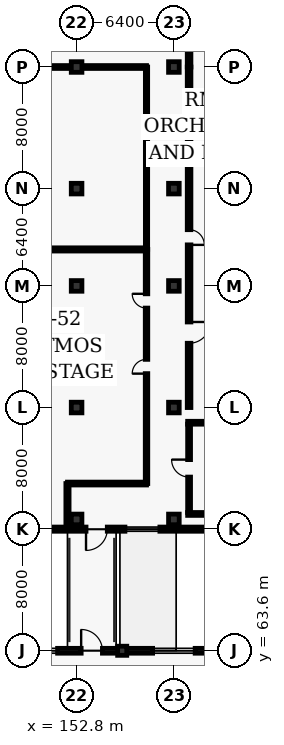
"""IFC4 building model, lengths in metres.
Left out: names, types, materials, properties, quantities, classifications, styles, units other than length and angle.
Written with IfcOpenShell. Run it as: python <this file> out.ifc"""

import sys

from ifc_helpers import new_model, si_unit, direction, frame, frame_2d, origin, origin_2d, place, context, subcontext, project, spatial, rectangle, extrude, element, fill, save


model = new_model("IFC4")
c1 = context("Model", 3, precision=1e-05, world=origin(), true_north=direction((0.0, 1.0)))
c2 = subcontext(c1, "Body", "Model", "MODEL_VIEW")
j1 = project(units=[si_unit("LENGTHUNIT", "METRE"), si_unit("PLANEANGLEUNIT", "RADIAN")], contexts=[c1])
p1 = place(None, origin())
s1 = spatial("IfcSite", under=j1, at=p1, CompositionType="ELEMENT")
p2 = place(p1, origin())
s2 = spatial("IfcBuilding", under=s1, at=p2, CompositionType="ELEMENT")
p3 = place(p2, frame((0.0, 0.0, 10.2)))
s3 = spatial("IfcBuildingStorey", under=s2, at=p3, CompositionType="ELEMENT", Elevation=10.2)
p4 = place(p3, frame((155.8, 63.6, 0.0), z_axis=(0.0, 0.0, 1.0), x_axis=(1.0, 0.0, 0.0)))
e1 = element("IfcColumn", 1, at=p4, inside=s3, PredefinedType="COLUMN", context=c2, shape_type="SweptSolid", body=[
    extrude(rectangle(XDim=0.6, YDim=0.6, at=origin_2d()), origin(), (0.0, 0.0, 1.0), 5.4),
])
for number, where, z_axis, x_axis in (
    (2, (152.8, 72.24, 0.0), (0.0, 0.0, 1.0), (1.0, 0.0, 0.0)),
    (3, (152.8, 79.6, 0.0), (0.0, 0.0, 1.0), (1.0, 0.0, 0.0)),
    (4, (152.8, 87.6, 0.0), (0.0, 0.0, 1.0), (1.0, 0.0, 0.0)),
    (5, (152.8, 94.0, 0.0), (0.0, 0.0, 1.0), (1.0, 0.0, 0.0)),
    (6, (152.8, 102.0, 0.0), (0.0, 0.0, 1.0), (1.0, 0.0, 0.0)),
    (7, (159.2, 72.24, 0.0), (0.0, 0.0, 1.0), (1.0, 0.0, 0.0)),
    (8, (159.2, 79.6, 0.0), (0.0, 0.0, 1.0), (1.0, 0.0, 0.0)),
    (9, (159.2, 87.6, 0.0), (0.0, 0.0, 1.0), (1.0, 0.0, 0.0)),
    (10, (159.2, 94.0, 0.0), (0.0, 0.0, 1.0), (1.0, 0.0, 0.0)),
    (11, (159.2, 102.0, 0.0), (0.0, 0.0, 1.0), (1.0, 0.0, 0.0)),
):
    element("IfcColumn", number, at=place(p3, frame(where, z_axis=z_axis, x_axis=x_axis)), inside=s3, PredefinedType="COLUMN", context=c2, shape_type="SweptSolid", body=[
        extrude(rectangle(XDim=0.7, YDim=0.7, at=origin_2d()), origin(), (0.0, 0.0, 1.0), 5.4),
    ])
p5 = place(p3, frame((149.2, 63.6, 0.0), z_axis=(0.0, 0.0, 1.0), x_axis=(1.0, 0.0, 0.0)))
e12 = element("IfcWall", 12, at=p5, inside=s3, PredefinedType="SOLIDWALL", context=c2, shape_type="SweptSolid", body=[
    extrude(rectangle(XDim=22.8, YDim=0.32, at=frame_2d((11.4, 0.0))), origin(), (0.0, 0.0, 1.0), 4.3),
])
p6 = place(p5, frame((0.75, 0.0, 0.9)))
e13 = element("IfcOpeningElement", 13, at=p6, cuts=e12, PredefinedType="OPENING", context=c2, shape_type="SweptSolid", body=[
    extrude(rectangle(XDim=1.6, YDim=1.65, at=frame_2d((0.8, 0.825))), frame((0.0, 0.17, 0.0), z_axis=(0.0, -1.0, 0.0), x_axis=(1.0, 0.0, 0.0)), (0.0, 0.0, 1.0), 0.34),
])
p7 = place(p5, frame((8.6, 0.0, 0.9)))
e14 = element("IfcOpeningElement", 14, at=p7, cuts=e12, PredefinedType="OPENING", context=c2, shape_type="SweptSolid", body=[
    extrude(rectangle(XDim=2.8, YDim=2.4, at=frame_2d((1.4, 1.2))), frame((0.0, 0.17, 0.0), z_axis=(0.0, -1.0, 0.0), x_axis=(1.0, 0.0, 0.0)), (0.0, 0.0, 1.0), 0.34),
])
p8 = place(p5, frame((3.9, 0.0, 0.0)))
e15 = element("IfcOpeningElement", 15, at=p8, cuts=e12, PredefinedType="OPENING", context=c2, shape_type="SweptSolid", body=[
    extrude(rectangle(XDim=1.4, YDim=2.25, at=frame_2d((0.7, 1.125))), frame((0.0, 0.17, 0.0), z_axis=(0.0, -1.0, 0.0), x_axis=(1.0, 0.0, 0.0)), (0.0, 0.0, 1.0), 0.34),
])
p9 = place(p3, frame((172.0, 71.6, 0.0), z_axis=(0.0, 0.0, 1.0), x_axis=(-1.0, 0.0, 0.0)))
e16 = element("IfcWall", 16, at=p9, inside=s3, PredefinedType="SOLIDWALL", context=c2, shape_type="SweptSolid", body=[
    extrude(rectangle(XDim=32.4, YDim=0.275, at=frame_2d((16.2, 0.0))), origin(), (0.0, 0.0, 1.0), 5.16),
])
p10 = place(p9, frame((7.96, 0.0, 0.8)))
e17 = element("IfcOpeningElement", 17, at=p10, cuts=e16, PredefinedType="OPENING", context=c2, shape_type="SweptSolid", body=[
    extrude(rectangle(XDim=2.2, YDim=2.25, at=frame_2d((1.1, 1.125))), frame((0.0, 0.147, 0.0), z_axis=(0.0, -1.0, 0.0), x_axis=(1.0, 0.0, 0.0)), (0.0, 0.0, 1.0), 0.295),
])
p11 = place(p9, frame((13.72, 0.0, 0.8)))
e18 = element("IfcOpeningElement", 18, at=p11, cuts=e16, PredefinedType="OPENING", context=c2, shape_type="SweptSolid", body=[
    extrude(rectangle(XDim=2.3, YDim=2.25, at=frame_2d((1.15, 1.125))), frame((0.0, 0.147, 0.0), z_axis=(0.0, -1.0, 0.0), x_axis=(1.0, 0.0, 0.0)), (0.0, 0.0, 1.0), 0.295),
])
p12 = place(p9, frame((20.93, 0.0, 0.8)))
e19 = element("IfcOpeningElement", 19, at=p12, cuts=e16, PredefinedType="OPENING", context=c2, shape_type="SweptSolid", body=[
    extrude(rectangle(XDim=2.4, YDim=2.3, at=frame_2d((1.2, 1.15))), frame((0.0, 0.147, 0.0), z_axis=(0.0, -1.0, 0.0), x_axis=(1.0, 0.0, 0.0)), (0.0, 0.0, 1.0), 0.295),
])
p13 = place(p9, frame((25.24, 0.0, 0.8)))
e20 = element("IfcOpeningElement", 20, at=p13, cuts=e16, PredefinedType="OPENING", context=c2, shape_type="SweptSolid", body=[
    extrude(rectangle(XDim=2.5, YDim=2.3, at=frame_2d((1.25, 1.15))), frame((0.0, 0.147, 0.0), z_axis=(0.0, -1.0, 0.0), x_axis=(1.0, 0.0, 0.0)), (0.0, 0.0, 1.0), 0.295),
])
p14 = place(p9, frame((17.18, 0.0, 0.0)))
e21 = element("IfcOpeningElement", 21, at=p14, cuts=e16, PredefinedType="OPENING", context=c2, shape_type="SweptSolid", body=[
    extrude(rectangle(XDim=1.4, YDim=2.25, at=frame_2d((0.7, 1.125))), frame((0.0, 0.147, 0.0), z_axis=(0.0, -1.0, 0.0), x_axis=(1.0, 0.0, 0.0)), (0.0, 0.0, 1.0), 0.295),
])
p15 = place(p3, frame((160.105, 72.6, 0.0), z_axis=(0.0, 0.0, 1.0), x_axis=(1.0, 0.0, 0.0)))
e22 = element("IfcWall", 22, at=p15, inside=s3, PredefinedType="PARTITIONING", context=c2, shape_type="SweptSolid", body=[
    extrude(rectangle(XDim=4.143, YDim=0.19, at=frame_2d((2.072, 0.0))), origin(), (0.0, 0.0, 1.0), 4.51),
])
p16 = place(p3, frame((160.105, 78.6, 0.0), z_axis=(0.0, 0.0, 1.0), x_axis=(1.0, 0.0, 0.0)))
e23 = element("IfcWall", 23, at=p16, inside=s3, PredefinedType="PARTITIONING", context=c2, shape_type="SweptSolid", body=[
    extrude(rectangle(XDim=4.495, YDim=0.19, at=frame_2d((2.248, 0.0))), origin(), (0.0, 0.0, 1.0), 5.16),
])
p17 = place(p3, frame((160.2, 72.695, 0.0), z_axis=(0.0, 0.0, 1.0), x_axis=(0.0, 1.0, 0.0)))
e24 = element("IfcWall", 24, at=p17, inside=s3, PredefinedType="PARTITIONING", context=c2, shape_type="SweptSolid", body=[
    extrude(rectangle(XDim=5.81, YDim=0.19, at=frame_2d((2.905, 0.0))), origin(), (0.0, 0.0, 1.0), 5.16),
])
p18 = place(p17, frame((2.33, 0.0, 0.0)))
e25 = element("IfcOpeningElement", 25, at=p18, cuts=e24, PredefinedType="OPENING", context=c2, shape_type="SweptSolid", body=[
    extrude(rectangle(XDim=1.15, YDim=2.2, at=frame_2d((0.575, 1.1))), frame((0.0, 0.105, 0.0), z_axis=(0.0, -1.0, 0.0), x_axis=(1.0, 0.0, 0.0)), (0.0, 0.0, 1.0), 0.21),
])
p19 = place(p3, frame((157.4, 102.0, 0.0), z_axis=(0.0, 0.0, 1.0), x_axis=(-1.0, 0.0, 0.0)))
e26 = element("IfcWall", 26, at=p19, inside=s3, PredefinedType="PARTITIONING", context=c2, shape_type="SweptSolid", body=[
    extrude(rectangle(XDim=17.8, YDim=0.19, at=frame_2d((8.9, 0.0))), origin(), (0.0, 0.0, 1.0), 4.51),
])
p20 = place(p19, frame((8.38, 0.0, 0.0)))
e27 = element("IfcOpeningElement", 27, at=p20, cuts=e26, PredefinedType="OPENING", context=c2, shape_type="SweptSolid", body=[
    extrude(rectangle(XDim=1.04, YDim=2.2, at=frame_2d((0.52, 1.1))), frame((0.0, 0.105, 0.0), z_axis=(0.0, -1.0, 0.0), x_axis=(1.0, 0.0, 0.0)), (0.0, 0.0, 1.0), 0.21),
])
p21 = place(p3, frame((160.2, 110.0, 0.0), z_axis=(0.0, 0.0, 1.0), x_axis=(0.0, -1.0, 0.0)))
e28 = element("IfcWall", 28, at=p21, inside=s3, PredefinedType="PARTITIONING", context=c2, shape_type="SweptSolid", body=[
    extrude(rectangle(XDim=8.0, YDim=0.24, at=frame_2d((4.0, 0.0))), origin(), (0.0, 0.0, 1.0), 5.16),
])
p22 = place(p3, frame((152.2, 71.6, 0.0), z_axis=(0.0, 0.0, 1.0), x_axis=(0.0, 1.0, 0.0)))
e29 = element("IfcWall", 29, at=p22, inside=s3, PredefinedType="PARTITIONING", context=c2, shape_type="SweptSolid", body=[
    extrude(rectangle(XDim=3.0, YDim=0.21, at=frame_2d((1.5, 0.0))), origin(), (0.0, 0.0, 1.0), 5.16),
])
p23 = place(p3, frame((152.2, 74.6, 0.0), z_axis=(0.0, 0.0, 1.0), x_axis=(1.0, 0.0, 0.0)))
e30 = element("IfcWall", 30, at=p23, inside=s3, PredefinedType="PARTITIONING", context=c2, shape_type="SweptSolid", body=[
    extrude(rectangle(XDim=5.2, YDim=0.19, at=frame_2d((2.6, 0.0))), origin(), (0.0, 0.0, 1.0), 5.16),
])
p24 = place(p3, frame((157.4, 74.6, 0.0), z_axis=(0.0, 0.0, 1.0), x_axis=(0.0, 1.0, 0.0)))
e31 = element("IfcWall", 31, at=p24, inside=s3, PredefinedType="PARTITIONING", context=c2, shape_type="SweptSolid", body=[
    extrude(rectangle(XDim=15.4, YDim=0.165, at=frame_2d((7.7, 0.0))), origin(), (0.0, 0.0, 1.0), 5.16),
])
p25 = place(p24, frame((7.23, 0.0, 0.0)))
e32 = element("IfcOpeningElement", 32, at=p25, cuts=e31, PredefinedType="OPENING", context=c2, shape_type="SweptSolid", body=[
    extrude(rectangle(XDim=0.94, YDim=2.15, at=frame_2d((0.47, 1.075))), frame((0.0, 0.093, 0.0), z_axis=(0.0, -1.0, 0.0), x_axis=(1.0, 0.0, 0.0)), (0.0, 0.0, 1.0), 0.185),
])
p26 = place(p24, frame((11.542, 0.0, 0.0)))
e33 = element("IfcOpeningElement", 33, at=p26, cuts=e31, PredefinedType="OPENING", context=c2, shape_type="SweptSolid", body=[
    extrude(rectangle(XDim=0.94, YDim=2.15, at=frame_2d((0.47, 1.075))), frame((0.0, 0.093, 0.0), z_axis=(0.0, -1.0, 0.0), x_axis=(1.0, 0.0, 0.0)), (0.0, 0.0, 1.0), 0.185),
])
p27 = place(p3, frame((157.4, 90.0, 0.0), z_axis=(0.0, 0.0, 1.0), x_axis=(0.0, 1.0, 0.0)))
e34 = element("IfcWall", 34, at=p27, inside=s3, PredefinedType="PARTITIONING", context=c2, shape_type="SweptSolid", body=[
    extrude(rectangle(XDim=12.0, YDim=0.15, at=frame_2d((6.0, 0.0))), origin(), (0.0, 0.0, 1.0), 5.16),
])
p28 = place(p3, frame((160.2, 102.0, 0.0), z_axis=(0.0, 0.0, 1.0), x_axis=(0.0, -1.0, 0.0)))
e35 = element("IfcWall", 35, at=p28, inside=s3, PredefinedType="PARTITIONING", context=c2, shape_type="SweptSolid", body=[
    extrude(rectangle(XDim=22.4, YDim=0.24, at=frame_2d((11.2, 0.0))), origin(), (0.0, 0.0, 1.0), 5.16),
])
p29 = place(p28, frame((10.7, 0.0, 0.0)))
e36 = element("IfcOpeningElement", 36, at=p29, cuts=e35, PredefinedType="OPENING", context=c2, shape_type="SweptSolid", body=[
    extrude(rectangle(XDim=1.0, YDim=2.1, at=frame_2d((0.5, 1.05))), frame((0.0, 0.13, 0.0), z_axis=(0.0, -1.0, 0.0), x_axis=(1.0, 0.0, 0.0)), (0.0, 0.0, 1.0), 0.26),
])
p30 = place(p28, frame((16.772, 0.0, 0.0)))
e37 = element("IfcOpeningElement", 37, at=p30, cuts=e35, PredefinedType="OPENING", context=c2, shape_type="SweptSolid", body=[
    extrude(rectangle(XDim=1.4, YDim=2.25, at=frame_2d((0.7, 1.125))), frame((0.0, 0.13, 0.0), z_axis=(0.0, -1.0, 0.0), x_axis=(1.0, 0.0, 0.0)), (0.0, 0.0, 1.0), 0.26),
])
p31 = place(p3, frame((139.6, 90.0, 0.0), z_axis=(0.0, 0.0, 1.0), x_axis=(1.0, 0.0, 0.0)))
e38 = element("IfcWall", 38, at=p31, inside=s3, PredefinedType="PARTITIONING", context=c2, shape_type="SweptSolid", body=[
    extrude(rectangle(XDim=17.8, YDim=0.21, at=frame_2d((8.9, 0.0))), origin(), (0.0, 0.0, 1.0), 5.16),
])
p32 = place(p6, origin())
e39 = element("IfcWindow", 39, at=p32, inside=s3, PartitioningType="SINGLE_PANEL", PredefinedType="WINDOW", context=c2, shape_type="SweptSolid", body=[
    extrude(rectangle(XDim=1.6, YDim=1.65, at=frame_2d((0.8, 0.825))), frame((0.0, 0.03, 0.0), z_axis=(0.0, -1.0, 0.0), x_axis=(1.0, 0.0, 0.0)), (0.0, 0.0, 1.0), 0.06),
])
fill(e13, e39)
p33 = place(p7, origin())
e40 = element("IfcWindow", 40, at=p33, inside=s3, PartitioningType="SINGLE_PANEL", PredefinedType="WINDOW", context=c2, shape_type="SweptSolid", body=[
    extrude(rectangle(XDim=2.8, YDim=2.4, at=frame_2d((1.4, 1.2))), frame((0.0, 0.03, 0.0), z_axis=(0.0, -1.0, 0.0), x_axis=(1.0, 0.0, 0.0)), (0.0, 0.0, 1.0), 0.06),
])
fill(e14, e40)
p34 = place(p11, origin())
e41 = element("IfcWindow", 41, at=p34, inside=s3, PartitioningType="SINGLE_PANEL", PredefinedType="WINDOW", context=c2, shape_type="SweptSolid", body=[
    extrude(rectangle(XDim=2.3, YDim=2.25, at=frame_2d((1.15, 1.125))), frame((0.0, 0.03, 0.0), z_axis=(0.0, -1.0, 0.0), x_axis=(1.0, 0.0, 0.0)), (0.0, 0.0, 1.0), 0.06),
])
fill(e18, e41)
p35 = place(p18, origin())
e42 = element("IfcDoor", 42, at=p35, inside=s3, OperationType="SINGLE_SWING_RIGHT", PredefinedType="DOOR", context=c2, shape_type="SweptSolid", body=[
    extrude(rectangle(XDim=1.15, YDim=2.2, at=frame_2d((0.575, 1.1))), frame((0.0, 0.025, 0.0), z_axis=(0.0, -1.0, 0.0), x_axis=(1.0, 0.0, 0.0)), (0.0, 0.0, 1.0), 0.05),
])
fill(e25, e42)
p36 = place(p8, origin())
e43 = element("IfcDoor", 43, at=p36, inside=s3, OperationType="SINGLE_SWING_LEFT", PredefinedType="DOOR", context=c2, shape_type="SweptSolid", body=[
    extrude(rectangle(XDim=1.4, YDim=2.25, at=frame_2d((0.7, 1.125))), frame((0.0, 0.025, 0.0), z_axis=(0.0, -1.0, 0.0), x_axis=(1.0, 0.0, 0.0)), (0.0, 0.0, 1.0), 0.05),
])
fill(e15, e43)
p37 = place(p14, origin())
e44 = element("IfcDoor", 44, at=p37, inside=s3, OperationType="SINGLE_SWING_RIGHT", PredefinedType="DOOR", context=c2, shape_type="SweptSolid", body=[
    extrude(rectangle(XDim=1.4, YDim=2.25, at=frame_2d((0.7, 1.125))), frame((0.0, 0.025, 0.0), z_axis=(0.0, -1.0, 0.0), x_axis=(1.0, 0.0, 0.0)), (0.0, 0.0, 1.0), 0.05),
])
fill(e21, e44)
p38 = place(p25, origin())
e45 = element("IfcDoor", 45, at=p38, inside=s3, OperationType="SINGLE_SWING_LEFT", PredefinedType="DOOR", context=c2, shape_type="SweptSolid", body=[
    extrude(rectangle(XDim=0.94, YDim=2.15, at=frame_2d((0.47, 1.075))), frame((0.0, 0.025, 0.0), z_axis=(0.0, -1.0, 0.0), x_axis=(1.0, 0.0, 0.0)), (0.0, 0.0, 1.0), 0.05),
])
fill(e32, e45)
p39 = place(p26, origin())
e46 = element("IfcDoor", 46, at=p39, inside=s3, OperationType="SINGLE_SWING_RIGHT", PredefinedType="DOOR", context=c2, shape_type="SweptSolid", body=[
    extrude(rectangle(XDim=0.94, YDim=2.15, at=frame_2d((0.47, 1.075))), frame((0.0, 0.025, 0.0), z_axis=(0.0, -1.0, 0.0), x_axis=(1.0, 0.0, 0.0)), (0.0, 0.0, 1.0), 0.05),
])
fill(e33, e46)
p40 = place(p29, origin())
e47 = element("IfcDoor", 47, at=p40, inside=s3, OperationType="SINGLE_SWING_RIGHT", PredefinedType="DOOR", context=c2, shape_type="SweptSolid", body=[
    extrude(rectangle(XDim=1.0, YDim=2.1, at=frame_2d((0.5, 1.05))), frame((0.0, 0.025, 0.0), z_axis=(0.0, -1.0, 0.0), x_axis=(1.0, 0.0, 0.0)), (0.0, 0.0, 1.0), 0.05),
])
fill(e36, e47)
p41 = place(p30, origin())
e48 = element("IfcDoor", 48, at=p41, inside=s3, OperationType="SINGLE_SWING_LEFT", PredefinedType="DOOR", context=c2, shape_type="SweptSolid", body=[
    extrude(rectangle(XDim=1.4, YDim=2.25, at=frame_2d((0.7, 1.125))), frame((0.0, 0.025, 0.0), z_axis=(0.0, -1.0, 0.0), x_axis=(1.0, 0.0, 0.0)), (0.0, 0.0, 1.0), 0.05),
])
fill(e37, e48)
save(model, sys.argv[1])
